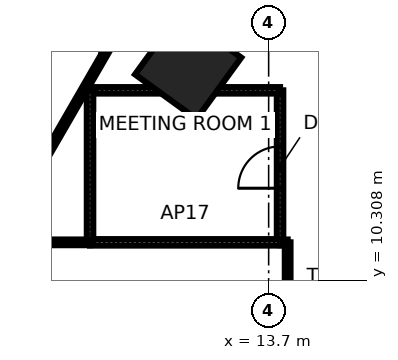
"""IFC4 building model, lengths in metres.
Left out: names, types, materials, properties, quantities, classifications, styles, units other than length and angle.
Written with IfcOpenShell. Run it as: python <this file> out.ifc"""

import sys

from ifc_helpers import new_model, si_unit, direction, frame, frame_2d, origin, origin_2d, place, context, subcontext, project, spatial, rectangle, extrude, element, fill, save


model = new_model("IFC4")
c1 = context("Model", 3, precision=1e-05, world=origin(), true_north=direction((0.0, 1.0)))
c2 = subcontext(c1, "Body", "Model", "MODEL_VIEW")
j1 = project(units=[si_unit("LENGTHUNIT", "METRE"), si_unit("PLANEANGLEUNIT", "RADIAN")], contexts=[c1])
p1 = place(None, origin())
s1 = spatial("IfcSite", under=j1, at=p1, CompositionType="ELEMENT")
p2 = place(p1, origin())
s2 = spatial("IfcBuilding", under=s1, at=p2, CompositionType="ELEMENT")
p3 = place(p2, frame((0.0, 0.0, 78.4)))
s3 = spatial("IfcBuildingStorey", under=s2, at=p3, CompositionType="ELEMENT", Elevation=78.4)
p4 = place(p3, frame((11.581, 15.94, 0.0), z_axis=(0.0, 0.0, 1.0), x_axis=(0.587785252292, 0.809016994375, 0.0)))
e1 = element("IfcColumn", 1, at=p4, inside=s3, PredefinedType="COLUMN", context=c2, shape_type="SweptSolid", body=[
    extrude(rectangle(XDim=2.0, YDim=2.0, at=origin_2d()), origin(), (0.0, 0.0, 1.0), 4.2),
])
p5 = place(p3, frame((14.2, 9.5, 0.0), z_axis=(0.0, 0.0, 1.0), x_axis=(0.0, 1.0, 0.0)))
e2 = element("IfcWall", 2, at=p5, inside=s3, PredefinedType="PARTITIONING", context=c2, shape_type="SweptSolid", body=[
    extrude(rectangle(XDim=1.8, YDim=0.15, at=frame_2d((0.9, 0.0))), origin(), (0.0, 0.0, 1.0), 4.04),
])
p6 = place(p3, frame((14.2, 11.3, 0.0), z_axis=(0.0, 0.0, 1.0), x_axis=(-1.0, 0.0, 0.0)))
e3 = element("IfcWall", 3, at=p6, inside=s3, PredefinedType="PARTITIONING", context=c2, shape_type="SweptSolid", body=[
    extrude(rectangle(XDim=0.2, YDim=0.15, at=frame_2d((0.1, 0.0))), origin(), (0.0, 0.0, 1.0), 4.04),
])
p7 = place(p3, frame((14.0, 11.3, 0.0), z_axis=(0.0, 0.0, 1.0), x_axis=(0.0, 1.0, 0.0)))
e4 = element("IfcWall", 4, at=p7, inside=s3, PredefinedType="PARTITIONING", context=c2, shape_type="SweptSolid", body=[
    extrude(rectangle(XDim=4.0, YDim=0.17, at=frame_2d((2.0, 0.0))), origin(), (0.0, 0.0, 1.0), 4.04),
])
p8 = place(p7, frame((1.424, 0.0, 0.0)))
e5 = element("IfcOpeningElement", 5, at=p8, cuts=e4, PredefinedType="OPENING", context=c2, shape_type="SweptSolid", body=[
    extrude(rectangle(XDim=1.1, YDim=2.4, at=frame_2d((0.55, 1.2))), frame((0.0, 0.095, 0.0), z_axis=(0.0, -1.0, 0.0), x_axis=(1.0, 0.0, 0.0)), (0.0, 0.0, 1.0), 0.19),
])
for number, where, z_axis, x_axis in (
    (6, (9.0, 11.3, 0.0), (0.0, 0.0, 1.0), (1.0, 0.0, 0.0)),
    (7, (14.0, 15.3, 0.0), (0.0, 0.0, 1.0), (-1.0, 0.0, 0.0)),
):
    element("IfcWall", number, at=place(p3, frame(where, z_axis=z_axis, x_axis=x_axis)), inside=s3, PredefinedType="PARTITIONING", context=c2, shape_type="SweptSolid", body=[
        extrude(rectangle(XDim=5.0, YDim=0.17, at=frame_2d((2.5, 0.0))), origin(), (0.0, 0.0, 1.0), 4.04),
    ])
p9 = place(p3, frame((9.0, 15.3, 0.0), z_axis=(0.0, 0.0, 1.0), x_axis=(0.0, -1.0, 0.0)))
e8 = element("IfcWall", 8, at=p9, inside=s3, PredefinedType="PARTITIONING", context=c2, shape_type="SweptSolid", body=[
    extrude(rectangle(XDim=4.0, YDim=0.17, at=frame_2d((2.0, 0.0))), origin(), (0.0, 0.0, 1.0), 4.04),
])
p10 = place(p3, frame((6.524, 11.3, 0.0), z_axis=(0.0, 0.0, 1.0), x_axis=(0.499989292232, 0.866031585829, 0.0)))
e9 = element("IfcWall", 9, at=p10, inside=s3, PredefinedType="PARTITIONING", context=c2, shape_type="SweptSolid", body=[
    extrude(rectangle(XDim=10.85, YDim=0.15, at=frame_2d((5.425, 0.0))), origin(), (0.0, 0.0, 1.0), 4.04),
])
p11 = place(p3, frame((9.0, 11.3, 0.0), z_axis=(0.0, 0.0, 1.0), x_axis=(-1.0, 0.0, 0.0)))
e10 = element("IfcWall", 10, at=p11, inside=s3, PredefinedType="PARTITIONING", context=c2, shape_type="SweptSolid", body=[
    extrude(rectangle(XDim=9.0, YDim=0.15, at=frame_2d((4.5, 0.0))), origin(), (0.0, 0.0, 1.0), 4.04),
])
p12 = place(p8, origin())
e11 = element("IfcDoor", 11, at=p12, inside=s3, OperationType="SINGLE_SWING_LEFT", PredefinedType="DOOR", context=c2, shape_type="SweptSolid", body=[
    extrude(rectangle(XDim=1.1, YDim=2.4, at=frame_2d((0.55, 1.2))), frame((0.0, 0.025, 0.0), z_axis=(0.0, -1.0, 0.0), x_axis=(1.0, 0.0, 0.0)), (0.0, 0.0, 1.0), 0.05),
])
fill(e5, e11)
save(model, sys.argv[1])
